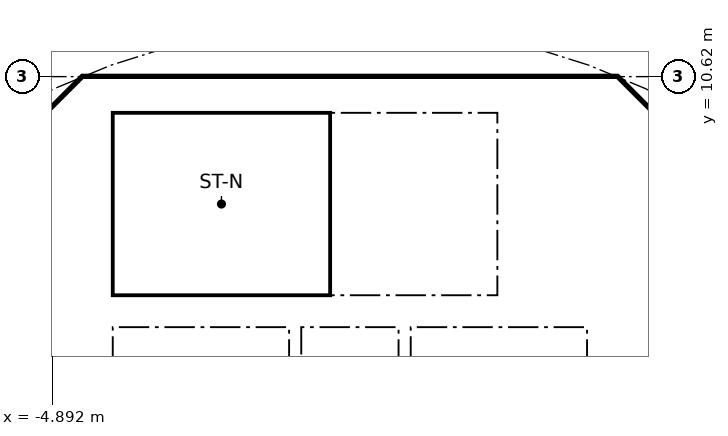
"""IFC4 building model, lengths in metres.
Left out: names, types, materials, properties, quantities, classifications, styles, units other than length and angle.
Written with IfcOpenShell. Run it as: python <this file> out.ifc"""

import sys

from ifc_helpers import new_model, si_unit, direction, frame, frame_2d, origin, place, context, subcontext, project, spatial, polyline, rectangle, outline, extrude, element, fill, save


model = new_model("IFC4")
c1 = context("Model", 3, precision=1e-05, world=origin(), true_north=direction((0.0, 1.0)))
c2 = subcontext(c1, "Body", "Model", "MODEL_VIEW")
j1 = project(units=[si_unit("LENGTHUNIT", "METRE"), si_unit("PLANEANGLEUNIT", "RADIAN")], contexts=[c1])
p1 = place(None, origin())
s1 = spatial("IfcSite", under=j1, at=p1, CompositionType="ELEMENT")
p2 = place(p1, origin())
s2 = spatial("IfcBuilding", under=s1, at=p2, CompositionType="ELEMENT")
p3 = place(p2, frame((0.0, 0.0, 145.5)))
s3 = spatial("IfcBuildingStorey", under=s2, at=p3, CompositionType="ELEMENT", Elevation=145.5)
p4 = place(p3, frame((9.988, 4.613, 0.0), z_axis=(0.0, 0.0, 1.0), x_axis=(-0.707106781187, 0.707106781187, 0.0)))
e1 = element("IfcWall", 1, at=p4, inside=s3, PredefinedType="SHEAR", context=c2, shape_type="SweptSolid", body=[
    extrude(rectangle(XDim=7.602, YDim=0.6, at=frame_2d((3.801, 0.0))), origin(), (0.0, 0.0, 1.0), 3.44),
])
p5 = place(p4, frame((3.201, 0.0, 0.0)))
e2 = element("IfcOpeningElement", 2, at=p5, cuts=e1, PredefinedType="OPENING", context=c2, shape_type="SweptSolid", body=[
    extrude(rectangle(XDim=1.2, YDim=2.1, at=frame_2d((0.6, 1.05))), frame((0.0, 0.31, 0.0), z_axis=(0.0, -1.0, 0.0), x_axis=(1.0, 0.0, 0.0)), (0.0, 0.0, 1.0), 0.62),
])
p6 = place(p3, frame((-4.613, 9.988, 0.0), z_axis=(0.0, 0.0, 1.0), x_axis=(-0.707106781187, -0.707106781187, 0.0)))
e3 = element("IfcWall", 3, at=p6, inside=s3, PredefinedType="SHEAR", context=c2, shape_type="SweptSolid", body=[
    extrude(rectangle(XDim=7.602, YDim=0.6, at=frame_2d((3.801, 0.0))), origin(), (0.0, 0.0, 1.0), 3.44),
])
p7 = place(p6, frame((0.351, 0.0, 0.0)))
e4 = element("IfcOpeningElement", 4, at=p7, cuts=e3, PredefinedType="OPENING", context=c2, shape_type="SweptSolid", body=[
    extrude(rectangle(XDim=1.1, YDim=2.1, at=frame_2d((0.55, 1.05))), frame((0.0, 0.31, 0.0), z_axis=(0.0, -1.0, 0.0), x_axis=(1.0, 0.0, 0.0)), (0.0, 0.0, 1.0), 0.62),
])
p8 = place(p3, frame((4.0, 4.3, 0.0), z_axis=(0.0, 0.0, 1.0), x_axis=(0.0, 1.0, 0.0)))
e5 = element("IfcWall", 5, at=p8, inside=s3, PredefinedType="SOLIDWALL", context=c2, shape_type="SweptSolid", body=[
    extrude(rectangle(XDim=2.2, YDim=0.2, at=frame_2d((1.1, 0.0))), origin(), (0.0, 0.0, 1.0), 3.44),
])
p9 = place(p8, frame((0.55, 0.0, 0.0)))
e6 = element("IfcOpeningElement", 6, at=p9, cuts=e5, PredefinedType="OPENING", context=c2, shape_type="SweptSolid", body=[
    extrude(rectangle(XDim=1.1, YDim=2.1, at=frame_2d((0.55, 1.05))), frame((0.0, 0.11, 0.0), z_axis=(0.0, -1.0, 0.0), x_axis=(1.0, 0.0, 0.0)), (0.0, 0.0, 1.0), 0.22),
])
p10 = place(p3, frame((-4.0, 4.3, 0.0), z_axis=(0.0, 0.0, 1.0), x_axis=(0.0, 1.0, 0.0)))
e7 = element("IfcWall", 7, at=p10, inside=s3, PredefinedType="SOLIDWALL", context=c2, shape_type="SweptSolid", body=[
    extrude(rectangle(XDim=2.2, YDim=0.2, at=frame_2d((1.1, 0.0))), origin(), (0.0, 0.0, 1.0), 3.44),
])
p11 = place(p10, frame((0.55, 0.0, 0.0)))
e8 = element("IfcOpeningElement", 8, at=p11, cuts=e7, PredefinedType="OPENING", context=c2, shape_type="SweptSolid", body=[
    extrude(rectangle(XDim=1.1, YDim=2.1, at=frame_2d((0.55, 1.05))), frame((0.0, 0.11, 0.0), z_axis=(0.0, -1.0, 0.0), x_axis=(1.0, 0.0, 0.0)), (0.0, 0.0, 1.0), 0.22),
])
p12 = place(p3, frame((4.0, 7.025, 0.0), z_axis=(0.0, 0.0, 1.0), x_axis=(0.0, 1.0, 0.0)))
e9 = element("IfcWall", 9, at=p12, inside=s3, PredefinedType="SOLIDWALL", context=c2, shape_type="SweptSolid", body=[
    extrude(rectangle(XDim=3.0, YDim=0.2, at=frame_2d((1.5, 0.0))), origin(), (0.0, 0.0, 1.0), 3.44),
])
p13 = place(p12, frame((0.925, 0.0, 0.0)))
e10 = element("IfcOpeningElement", 10, at=p13, cuts=e9, PredefinedType="OPENING", context=c2, shape_type="SweptSolid", body=[
    extrude(rectangle(XDim=1.1, YDim=2.1, at=frame_2d((0.55, 1.05))), frame((0.0, 0.11, 0.0), z_axis=(0.0, -1.0, 0.0), x_axis=(1.0, 0.0, 0.0)), (0.0, 0.0, 1.0), 0.22),
])
p14 = place(p3, origin())
e11 = element("IfcWall", 11, at=p14, inside=s3, PredefinedType="SHEAR", context=c2, shape_type="SweptSolid", body=[
    extrude(outline(polyline([(-4.152, 10.025), (-4.401, 9.776), (-4.825, 10.2), (-4.401, 10.625), (4.401, 10.625), (4.825, 10.2), (4.401, 9.776), (4.152, 10.025), (-4.152, 10.025)])), origin(), (0.0, 0.0, 1.0), 3.44),
])
for number, where, z_axis, x_axis in (
    (12, (-0.9, 4.3, 0.0), (0.0, 0.0, 1.0), (0.0, 1.0, 0.0)),
    (13, (0.9, 4.3, 0.0), (0.0, 0.0, 1.0), (0.0, 1.0, 0.0)),
):
    element("IfcWall", number, at=place(p3, frame(where, z_axis=z_axis, x_axis=x_axis)), inside=s3, PredefinedType="SOLIDWALL", context=c2, shape_type="SweptSolid", body=[
        extrude(rectangle(XDim=2.2, YDim=0.2, at=frame_2d((1.1, 0.0))), origin(), (0.0, 0.0, 1.0), 3.44),
    ])
p15 = place(p3, origin())
e14 = element("IfcWall", 14, at=p15, inside=s3, PredefinedType="SOLIDWALL", context=c2, shape_type="SweptSolid", body=[
    extrude(outline(polyline([(-3.9, 7.025), (-4.1, 7.025), (-4.1, 10.025), (-3.9, 10.025), (-3.9, 7.025)])), origin(), (0.0, 0.0, 1.0), 3.44),
])
p16 = place(p3, origin())
e15 = element("IfcWall", 15, at=p16, inside=s3, PredefinedType="SOLIDWALL", context=c2, shape_type="SweptSolid", body=[
    extrude(outline(polyline([(4.1, 6.5), (-4.1, 6.5), (-4.1, 7.025), (4.1, 7.025), (4.1, 6.5)])), origin(), (0.0, 0.0, 1.0), 3.44),
])
p17 = place(p13, origin())
e16 = element("IfcDoor", 16, at=p17, inside=s3, OperationType="SINGLE_SWING_LEFT", PredefinedType="DOOR", context=c2, shape_type="SweptSolid", body=[
    extrude(rectangle(XDim=1.1, YDim=2.1, at=frame_2d((0.55, 1.05))), frame((0.0, 0.025, 0.0), z_axis=(0.0, -1.0, 0.0), x_axis=(1.0, 0.0, 0.0)), (0.0, 0.0, 1.0), 0.05),
])
fill(e10, e16)
p18 = place(p7, origin())
e17 = element("IfcDoor", 17, at=p18, inside=s3, OperationType="SINGLE_SWING_LEFT", PredefinedType="DOOR", context=c2, shape_type="SweptSolid", body=[
    extrude(rectangle(XDim=1.1, YDim=2.1, at=frame_2d((0.55, 1.05))), frame((0.0, 0.025, 0.0), z_axis=(0.0, -1.0, 0.0), x_axis=(1.0, 0.0, 0.0)), (0.0, 0.0, 1.0), 0.05),
])
fill(e4, e17)
save(model, sys.argv[1])
